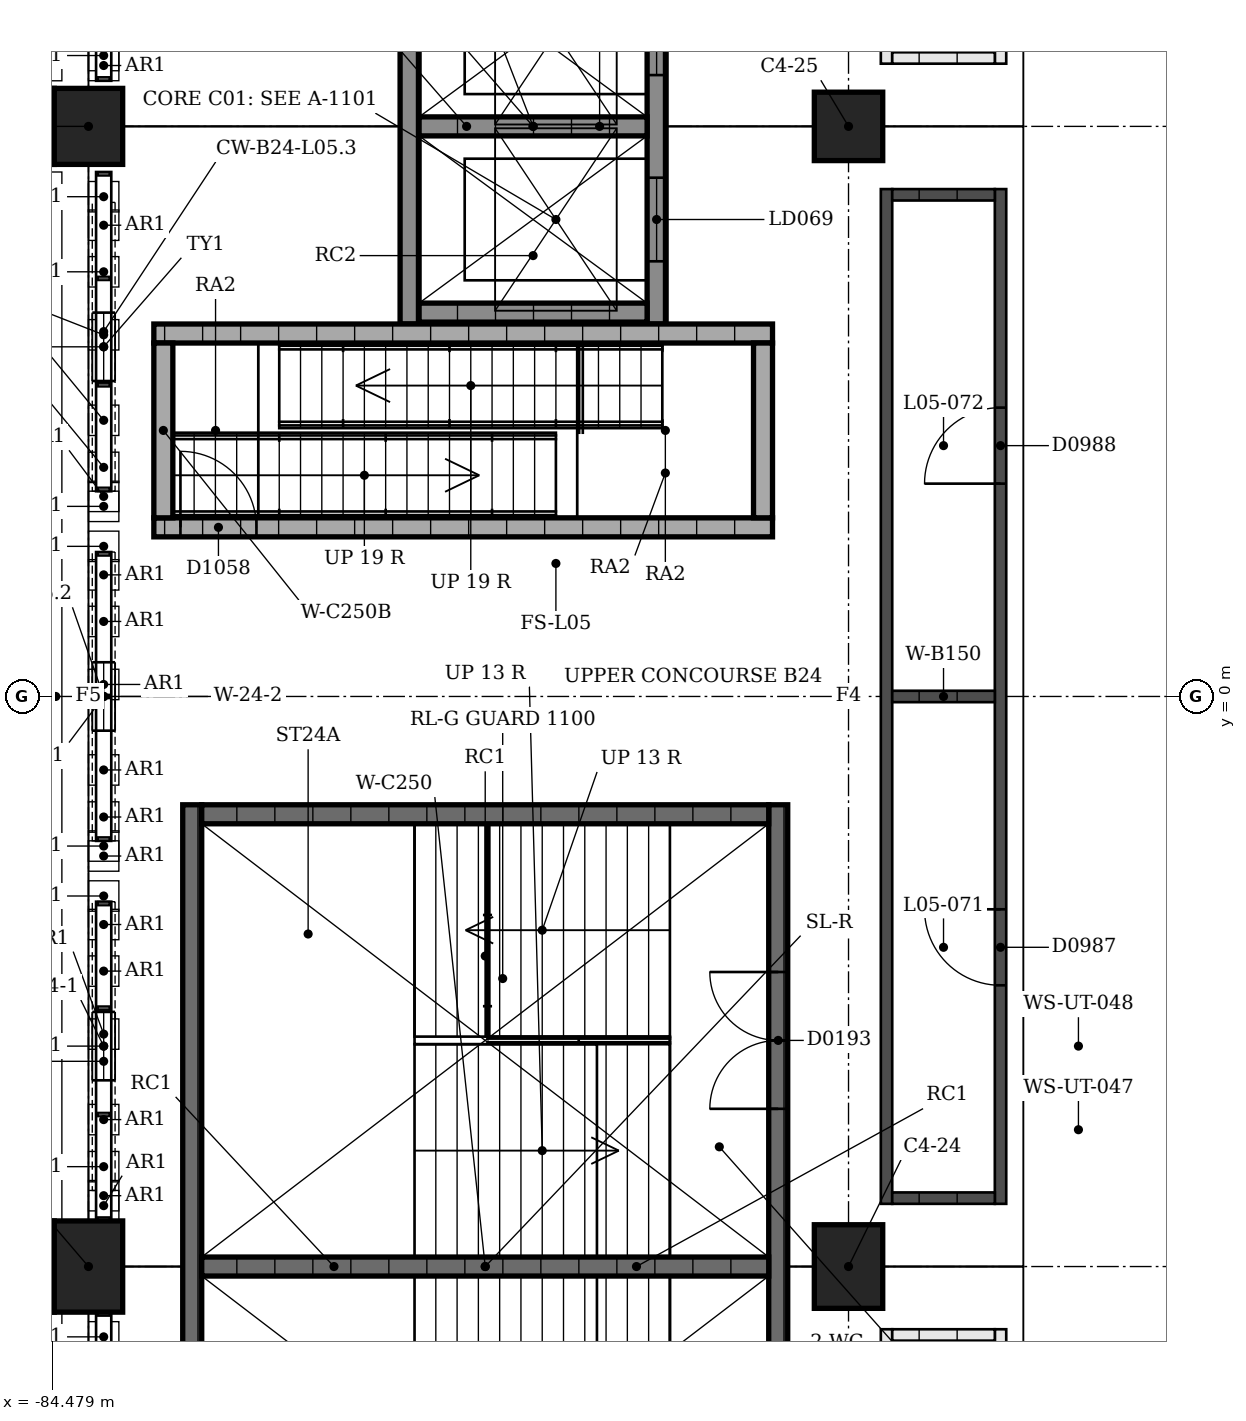
"""IFC4 building model, lengths in metres.
Left out: names, types, materials, properties, quantities, classifications, styles, units other than length and angle.
Written with IfcOpenShell. Run it as: python <this file> out.ifc"""

import sys

from ifc_helpers import new_model, si_unit, direction, frame, frame_2d, origin, origin_2d, place, context, subcontext, project, spatial, polyline, rectangle, outline, extrude, element, fill, save


model = new_model("IFC4")
c1 = context("Model", 3, precision=1e-05, world=origin(), true_north=direction((0.0, 1.0)))
c2 = subcontext(c1, "Body", "Model", "MODEL_VIEW")
j1 = project(units=[si_unit("LENGTHUNIT", "METRE"), si_unit("PLANEANGLEUNIT", "RADIAN")], contexts=[c1])
p1 = place(None, origin())
s1 = spatial("IfcSite", under=j1, at=p1, CompositionType="ELEMENT")
p2 = place(p1, origin())
s2 = spatial("IfcBuilding", under=s1, at=p2, CompositionType="ELEMENT")
p3 = place(p2, frame((0.0, 0.0, 22.5)))
s3 = spatial("IfcBuildingStorey", under=s2, at=p3, CompositionType="ELEMENT", Elevation=22.5)
p4 = place(p3, frame((-74.0, -7.5, 0.0), z_axis=(0.0, 0.0, 1.0), x_axis=(0.0, -1.0, 0.0)))
e1 = element("IfcColumn", 1, at=p4, inside=s3, PredefinedType="COLUMN", context=c2, shape_type="SweptSolid", body=[
    extrude(rectangle(XDim=1.1, YDim=0.9, at=origin_2d()), origin(), (0.0, 0.0, 1.0), 6.5),
])
p5 = place(p3, frame((-84.0, -7.5, 0.0), z_axis=(0.0, 0.0, 1.0), x_axis=(0.0, -1.0, 0.0)))
e2 = element("IfcColumn", 2, at=p5, inside=s3, PredefinedType="COLUMN", context=c2, shape_type="SweptSolid", body=[
    extrude(rectangle(XDim=1.2, YDim=0.9, at=origin_2d()), origin(), (0.0, 0.0, 1.0), 6.5),
])
p6 = place(p3, frame((-74.0, 7.5, 0.0), z_axis=(0.0, 0.0, 1.0), x_axis=(0.0, -1.0, 0.0)))
e3 = element("IfcColumn", 3, at=p6, inside=s3, PredefinedType="COLUMN", context=c2, shape_type="SweptSolid", body=[
    extrude(rectangle(XDim=0.9, YDim=0.9, at=origin_2d()), origin(), (0.0, 0.0, 1.0), 6.5),
])
p7 = place(p3, frame((-84.0, 7.5, 0.0), z_axis=(0.0, 0.0, 1.0), x_axis=(0.0, -1.0, 0.0)))
e4 = element("IfcColumn", 4, at=p7, inside=s3, PredefinedType="COLUMN", context=c2, shape_type="SweptSolid", body=[
    extrude(rectangle(XDim=1.0, YDim=0.9, at=origin_2d()), origin(), (0.0, 0.0, 1.0), 6.5),
])
p8 = place(p3, frame((-83.8, -6.5, 4.1), z_axis=(0.0, 0.0, 1.0), x_axis=(0.0, 1.0, 0.0)))
e5 = element("IfcWall", 5, at=p8, inside=s3, PredefinedType="SOLIDWALL", context=c2, shape_type="SweptSolid", body=[
    extrude(outline(polyline([(0.0, 0.0), (3.8, 0.0), (3.8, 0.05), (3.676, 1.314), (3.308, 2.581), (2.709, 3.757), (1.9, 4.8), (1.091, 3.757), (0.492, 2.581), (0.124, 1.314), (0.0, 0.05), (0.0, 0.0)])), frame((0.0, 0.15, 0.0), z_axis=(0.0, -1.0, 0.0), x_axis=(1.0, 0.0, 0.0)), (0.0, 0.0, 1.0), 0.3),
])
p9 = place(p8, frame((1.45, 0.0, 0.4)))
e6 = element("IfcOpeningElement", 6, at=p9, cuts=e5, PredefinedType="OPENING", context=c2, shape_type="SweptSolid", body=[
    extrude(rectangle(XDim=0.9, YDim=3.6, at=frame_2d((0.45, 1.8))), frame((0.0, 0.16, 0.0), z_axis=(0.0, -1.0, 0.0), x_axis=(1.0, 0.0, 0.0)), (0.0, 0.0, 1.0), 0.32),
])
p10 = place(p3, frame((-83.8, -1.9, 4.1), z_axis=(0.0, 0.0, 1.0), x_axis=(0.0, 1.0, 0.0)))
e7 = element("IfcWall", 7, at=p10, inside=s3, PredefinedType="SOLIDWALL", context=c2, shape_type="SweptSolid", body=[
    extrude(outline(polyline([(0.0, 0.0), (3.8, 0.0), (3.8, 0.05), (3.676, 1.314), (3.308, 2.581), (2.709, 3.757), (1.9, 4.8), (1.091, 3.757), (0.492, 2.581), (0.124, 1.314), (0.0, 0.05), (0.0, 0.0)])), frame((0.0, 0.15, 0.0), z_axis=(0.0, -1.0, 0.0), x_axis=(1.0, 0.0, 0.0)), (0.0, 0.0, 1.0), 0.3),
])
p11 = place(p10, frame((1.45, 0.0, 0.4)))
e8 = element("IfcOpeningElement", 8, at=p11, cuts=e7, PredefinedType="OPENING", context=c2, shape_type="SweptSolid", body=[
    extrude(rectangle(XDim=0.9, YDim=3.6, at=frame_2d((0.45, 1.8))), frame((0.0, 0.16, 0.0), z_axis=(0.0, -1.0, 0.0), x_axis=(1.0, 0.0, 0.0)), (0.0, 0.0, 1.0), 0.32),
])
p12 = place(p3, frame((-83.8, 2.7, 4.1), z_axis=(0.0, 0.0, 1.0), x_axis=(0.0, 1.0, 0.0)))
e9 = element("IfcWall", 9, at=p12, inside=s3, PredefinedType="SOLIDWALL", context=c2, shape_type="SweptSolid", body=[
    extrude(outline(polyline([(0.0, 0.0), (3.8, 0.0), (3.8, 0.05), (3.676, 1.314), (3.308, 2.581), (2.709, 3.757), (1.9, 4.8), (1.091, 3.757), (0.492, 2.581), (0.124, 1.314), (0.0, 0.05), (0.0, 0.0)])), frame((0.0, 0.15, 0.0), z_axis=(0.0, -1.0, 0.0), x_axis=(1.0, 0.0, 0.0)), (0.0, 0.0, 1.0), 0.3),
])
p13 = place(p12, frame((1.45, 0.0, 0.4)))
e10 = element("IfcOpeningElement", 10, at=p13, cuts=e9, PredefinedType="OPENING", context=c2, shape_type="SweptSolid", body=[
    extrude(rectangle(XDim=0.9, YDim=3.6, at=frame_2d((0.45, 1.8))), frame((0.0, 0.16, 0.0), z_axis=(0.0, -1.0, 0.0), x_axis=(1.0, 0.0, 0.0)), (0.0, 0.0, 1.0), 0.32),
])
p14 = place(p3, frame((-74.925, -1.425, 0.0), z_axis=(0.0, 0.0, 1.0), x_axis=(0.0, -1.0, 0.0)))
e11 = element("IfcWall", 11, at=p14, inside=s3, PredefinedType="SHEAR", context=c2, shape_type="SweptSolid", body=[
    extrude(rectangle(XDim=12.15, YDim=0.25, at=frame_2d((6.075, 0.0))), origin(), (0.0, 0.0, 1.0), 2.1),
])
p15 = place(p14, frame((2.2, 0.0, 0.0)))
e12 = element("IfcOpeningElement", 12, at=p15, cuts=e11, PredefinedType="OPENING", context=c2, shape_type="SweptSolid", body=[
    extrude(rectangle(XDim=1.8, YDim=2.1, at=frame_2d((0.9, 1.05))), frame((0.0, 0.125, 0.0), z_axis=(0.0, -1.0, 0.0), x_axis=(1.0, 0.0, 0.0)), (0.0, 0.0, 1.0), 0.25),
])
p16 = place(p14, frame((8.15, 0.0, 0.0)))
e13 = element("IfcOpeningElement", 13, at=p16, cuts=e11, PredefinedType="OPENING", context=c2, shape_type="SweptSolid", body=[
    extrude(rectangle(XDim=1.8, YDim=2.1, at=frame_2d((0.9, 1.05))), frame((0.0, 0.125, 0.0), z_axis=(0.0, -1.0, 0.0), x_axis=(1.0, 0.0, 0.0)), (0.0, 0.0, 1.0), 0.25),
])
p17 = place(p3, frame((-82.635, -1.425, 0.0), z_axis=(0.0, 0.0, 1.0), x_axis=(0.0, -1.0, 0.0)))
e14 = element("IfcWall", 14, at=p17, inside=s3, PredefinedType="SHEAR", context=c2, shape_type="SweptSolid", body=[
    extrude(rectangle(XDim=12.15, YDim=0.25, at=frame_2d((6.075, 0.0))), origin(), (0.0, 0.0, 1.0), 2.1),
])
for number, where, z_axis, x_axis in (
    (15, (-75.05, -1.55, 0.0), (0.0, 0.0, 1.0), (-1.0, 0.0, 0.0)),
    (16, (-75.05, -7.5, 0.0), (0.0, 0.0, 1.0), (-1.0, 0.0, 0.0)),
):
    element("IfcWall", number, at=place(p3, frame(where, z_axis=z_axis, x_axis=x_axis)), inside=s3, PredefinedType="SHEAR", context=c2, shape_type="SweptSolid", body=[
        extrude(rectangle(XDim=7.46, YDim=0.25, at=frame_2d((3.73, 0.0))), origin(), (0.0, 0.0, 1.0), 2.1),
    ])
p18 = place(p3, frame((-76.525, 10.075, 0.0), z_axis=(0.0, 0.0, 1.0), x_axis=(0.0, -1.0, 0.0)))
e17 = element("IfcWall", 17, at=p18, inside=s3, PredefinedType="SHEAR", context=c2, shape_type="SweptSolid", body=[
    extrude(rectangle(XDim=5.175, YDim=0.25, at=frame_2d((2.587, 0.0))), origin(), (0.0, 0.0, 1.0), 3.4),
])
p19 = place(p18, frame((0.8, 0.0, 0.0)))
e18 = element("IfcOpeningElement", 18, at=p19, cuts=e17, PredefinedType="OPENING", context=c2, shape_type="SweptSolid", body=[
    extrude(rectangle(XDim=1.1, YDim=2.1, at=frame_2d((0.55, 1.05))), frame((0.0, 0.125, 0.0), z_axis=(0.0, -1.0, 0.0), x_axis=(1.0, 0.0, 0.0)), (0.0, 0.0, 1.0), 0.25),
])
p20 = place(p18, frame((3.25, 0.0, 0.0)))
e19 = element("IfcOpeningElement", 19, at=p20, cuts=e17, PredefinedType="OPENING", context=c2, shape_type="SweptSolid", body=[
    extrude(rectangle(XDim=1.1, YDim=2.1, at=frame_2d((0.55, 1.05))), frame((0.0, 0.125, 0.0), z_axis=(0.0, -1.0, 0.0), x_axis=(1.0, 0.0, 0.0)), (0.0, 0.0, 1.0), 0.25),
])
p21 = place(p3, frame((-79.775, 10.075, 0.0), z_axis=(0.0, 0.0, 1.0), x_axis=(0.0, -1.0, 0.0)))
e20 = element("IfcWall", 20, at=p21, inside=s3, PredefinedType="SHEAR", context=c2, shape_type="SweptSolid", body=[
    extrude(rectangle(XDim=5.175, YDim=0.25, at=frame_2d((2.587, 0.0))), origin(), (0.0, 0.0, 1.0), 3.4),
])
for number, where, z_axis, x_axis in (
    (21, (-76.65, 5.05, 0.0), (0.0, 0.0, 1.0), (-1.0, 0.0, 0.0)),
    (22, (-76.65, 7.5, 0.0), (0.0, 0.0, 1.0), (-1.0, 0.0, 0.0)),
):
    element("IfcWall", number, at=place(p3, frame(where, z_axis=z_axis, x_axis=x_axis)), inside=s3, PredefinedType="SHEAR", context=c2, shape_type="SweptSolid", body=[
        extrude(rectangle(XDim=3.0, YDim=0.25, at=frame_2d((1.5, 0.0))), origin(), (0.0, 0.0, 1.0), 3.4),
    ])
p22 = place(p3, frame((-72.0, -8.325, 0.0), z_axis=(0.0, 0.0, 1.0), x_axis=(0.0, -1.0, 0.0)))
e23 = element("IfcWall", 23, at=p22, inside=s3, PredefinedType="PARTITIONING", context=c2, shape_type="SweptSolid", body=[
    extrude(rectangle(XDim=13.35, YDim=0.15, at=frame_2d((6.675, 0.0))), origin(), (0.0, 0.0, 1.0), 3.0),
])
p23 = place(p22, frame((1.671, 0.0, 0.0)))
e24 = element("IfcOpeningElement", 24, at=p23, cuts=e23, PredefinedType="OPENING", context=c2, shape_type="SweptSolid", body=[
    extrude(rectangle(XDim=0.9, YDim=2.1, at=frame_2d((0.45, 1.05))), frame((0.0, 0.075, 0.0), z_axis=(0.0, -1.0, 0.0), x_axis=(1.0, 0.0, 0.0)), (0.0, 0.0, 1.0), 0.15),
])
p24 = place(p22, frame((5.763, 0.0, 0.0)))
e25 = element("IfcOpeningElement", 25, at=p24, cuts=e23, PredefinedType="OPENING", context=c2, shape_type="SweptSolid", body=[
    extrude(rectangle(XDim=0.9, YDim=2.1, at=frame_2d((0.45, 1.05))), frame((0.0, 0.075, 0.0), z_axis=(0.0, -1.0, 0.0), x_axis=(1.0, 0.0, 0.0)), (0.0, 0.0, 1.0), 0.15),
])
p25 = place(p22, frame((8.963, 0.0, 0.0)))
e26 = element("IfcOpeningElement", 26, at=p25, cuts=e23, PredefinedType="OPENING", context=c2, shape_type="SweptSolid", body=[
    extrude(rectangle(XDim=1.1, YDim=2.1, at=frame_2d((0.55, 1.05))), frame((0.0, 0.075, 0.0), z_axis=(0.0, -1.0, 0.0), x_axis=(1.0, 0.0, 0.0)), (0.0, 0.0, 1.0), 0.15),
])
p26 = place(p22, frame((11.471, 0.0, 0.0)))
e27 = element("IfcOpeningElement", 27, at=p26, cuts=e23, PredefinedType="OPENING", context=c2, shape_type="SweptSolid", body=[
    extrude(rectangle(XDim=1.1, YDim=2.1, at=frame_2d((0.55, 1.05))), frame((0.0, 0.075, 0.0), z_axis=(0.0, -1.0, 0.0), x_axis=(1.0, 0.0, 0.0)), (0.0, 0.0, 1.0), 0.15),
])
p27 = place(p3, frame((-73.5, -8.325, 0.0), z_axis=(0.0, 0.0, 1.0), x_axis=(0.0, -1.0, 0.0)))
e28 = element("IfcWall", 28, at=p27, inside=s3, PredefinedType="PARTITIONING", context=c2, shape_type="SweptSolid", body=[
    extrude(rectangle(XDim=13.35, YDim=0.15, at=frame_2d((6.675, 0.0))), origin(), (0.0, 0.0, 1.0), 3.0),
])
p28 = place(p3, frame((-72.075, -8.4, 0.0), z_axis=(0.0, 0.0, 1.0), x_axis=(-1.0, 0.0, 0.0)))
e29 = element("IfcWall", 29, at=p28, inside=s3, PredefinedType="PARTITIONING", context=c2, shape_type="SweptSolid", body=[
    extrude(rectangle(XDim=1.35, YDim=0.15, at=frame_2d((0.675, 0.0))), origin(), (0.0, 0.0, 1.0), 3.0),
])
p29 = place(p3, frame((-72.0, -6.675, 0.0), z_axis=(0.0, 0.0, 1.0), x_axis=(0.0, 1.0, 0.0)))
e30 = element("IfcWall", 30, at=p29, inside=s3, PredefinedType="SOLIDWALL", context=c2, shape_type="SweptSolid", body=[
    extrude(rectangle(XDim=13.35, YDim=0.15, at=frame_2d((6.675, 0.0))), origin(), (0.0, 0.0, 1.0), 3.0),
])
p30 = place(p29, frame((2.875, 0.0, 0.0)))
e31 = element("IfcOpeningElement", 31, at=p30, cuts=e30, PredefinedType="OPENING", context=c2, shape_type="SweptSolid", body=[
    extrude(rectangle(XDim=1.0, YDim=2.1, at=frame_2d((0.5, 1.05))), frame((0.0, 0.075, 0.0), z_axis=(0.0, -1.0, 0.0), x_axis=(1.0, 0.0, 0.0)), (0.0, 0.0, 1.0), 0.15),
])
p31 = place(p29, frame((9.475, 0.0, 0.0)))
e32 = element("IfcOpeningElement", 32, at=p31, cuts=e30, PredefinedType="OPENING", context=c2, shape_type="SweptSolid", body=[
    extrude(rectangle(XDim=1.0, YDim=2.1, at=frame_2d((0.5, 1.05))), frame((0.0, 0.075, 0.0), z_axis=(0.0, -1.0, 0.0), x_axis=(1.0, 0.0, 0.0)), (0.0, 0.0, 1.0), 0.15),
])
p32 = place(p3, frame((-73.5, -6.675, 0.0), z_axis=(0.0, 0.0, 1.0), x_axis=(0.0, 1.0, 0.0)))
e33 = element("IfcWall", 33, at=p32, inside=s3, PredefinedType="SOLIDWALL", context=c2, shape_type="SweptSolid", body=[
    extrude(rectangle(XDim=13.35, YDim=0.15, at=frame_2d((6.675, 0.0))), origin(), (0.0, 0.0, 1.0), 3.0),
])
for number, where, z_axis, x_axis in (
    (34, (-72.075, -6.6, 0.0), (0.0, 0.0, 1.0), (-1.0, 0.0, 0.0)),
    (35, (-72.075, 0.0, 0.0), (0.0, 0.0, 1.0), (-1.0, 0.0, 0.0)),
    (36, (-72.075, 6.6, 0.0), (0.0, 0.0, 1.0), (-1.0, 0.0, 0.0)),
):
    element("IfcWall", number, at=place(p3, frame(where, z_axis=z_axis, x_axis=x_axis)), inside=s3, PredefinedType="SOLIDWALL", context=c2, shape_type="SweptSolid", body=[
        extrude(rectangle(XDim=1.35, YDim=0.15, at=frame_2d((0.675, 0.0))), origin(), (0.0, 0.0, 1.0), 3.0),
    ])
p33 = place(p3, frame((-72.0, 21.675, 0.0), z_axis=(0.0, 0.0, 1.0), x_axis=(0.0, -1.0, 0.0)))
e37 = element("IfcWall", 37, at=p33, inside=s3, PredefinedType="PARTITIONING", context=c2, shape_type="SweptSolid", body=[
    extrude(rectangle(XDim=13.35, YDim=0.15, at=frame_2d((6.675, 0.0))), origin(), (0.0, 0.0, 1.0), 3.0),
])
p34 = place(p33, frame((1.671, 0.0, 0.0)))
e38 = element("IfcOpeningElement", 38, at=p34, cuts=e37, PredefinedType="OPENING", context=c2, shape_type="SweptSolid", body=[
    extrude(rectangle(XDim=0.9, YDim=2.1, at=frame_2d((0.45, 1.05))), frame((0.0, 0.075, 0.0), z_axis=(0.0, -1.0, 0.0), x_axis=(1.0, 0.0, 0.0)), (0.0, 0.0, 1.0), 0.15),
])
p35 = place(p33, frame((5.763, 0.0, 0.0)))
e39 = element("IfcOpeningElement", 39, at=p35, cuts=e37, PredefinedType="OPENING", context=c2, shape_type="SweptSolid", body=[
    extrude(rectangle(XDim=0.9, YDim=2.1, at=frame_2d((0.45, 1.05))), frame((0.0, 0.075, 0.0), z_axis=(0.0, -1.0, 0.0), x_axis=(1.0, 0.0, 0.0)), (0.0, 0.0, 1.0), 0.15),
])
p36 = place(p33, frame((8.963, 0.0, 0.0)))
e40 = element("IfcOpeningElement", 40, at=p36, cuts=e37, PredefinedType="OPENING", context=c2, shape_type="SweptSolid", body=[
    extrude(rectangle(XDim=1.1, YDim=2.1, at=frame_2d((0.55, 1.05))), frame((0.0, 0.075, 0.0), z_axis=(0.0, -1.0, 0.0), x_axis=(1.0, 0.0, 0.0)), (0.0, 0.0, 1.0), 0.15),
])
p37 = place(p33, frame((11.471, 0.0, 0.0)))
e41 = element("IfcOpeningElement", 41, at=p37, cuts=e37, PredefinedType="OPENING", context=c2, shape_type="SweptSolid", body=[
    extrude(rectangle(XDim=1.1, YDim=2.1, at=frame_2d((0.55, 1.05))), frame((0.0, 0.075, 0.0), z_axis=(0.0, -1.0, 0.0), x_axis=(1.0, 0.0, 0.0)), (0.0, 0.0, 1.0), 0.15),
])
p38 = place(p3, frame((-73.5, 21.675, 0.0), z_axis=(0.0, 0.0, 1.0), x_axis=(0.0, -1.0, 0.0)))
e42 = element("IfcWall", 42, at=p38, inside=s3, PredefinedType="PARTITIONING", context=c2, shape_type="SweptSolid", body=[
    extrude(rectangle(XDim=13.35, YDim=0.15, at=frame_2d((6.675, 0.0))), origin(), (0.0, 0.0, 1.0), 3.0),
])
p39 = place(p3, frame((-72.075, 8.4, 0.0), z_axis=(0.0, 0.0, 1.0), x_axis=(-1.0, 0.0, 0.0)))
e43 = element("IfcWall", 43, at=p39, inside=s3, PredefinedType="PARTITIONING", context=c2, shape_type="SweptSolid", body=[
    extrude(rectangle(XDim=1.35, YDim=0.15, at=frame_2d((0.675, 0.0))), origin(), (0.0, 0.0, 1.0), 3.0),
])
p40 = place(p3, frame((-75.0, 4.775, 0.0), z_axis=(0.0, 0.0, 1.0), x_axis=(-1.0, 0.0, 0.0)))
e44 = element("IfcWall", 44, at=p40, inside=s3, PredefinedType="SHEAR", context=c2, shape_type="SweptSolid", body=[
    extrude(rectangle(XDim=8.14, YDim=0.25, at=frame_2d((4.07, 0.0))), origin(), (0.0, 0.0, 1.0), 7.6),
])
p41 = place(p3, frame((-75.0, 2.225, 0.0), z_axis=(0.0, 0.0, 1.0), x_axis=(-1.0, 0.0, 0.0)))
e45 = element("IfcWall", 45, at=p41, inside=s3, PredefinedType="SHEAR", context=c2, shape_type="SweptSolid", body=[
    extrude(rectangle(XDim=8.14, YDim=0.25, at=frame_2d((4.07, 0.0))), origin(), (0.0, 0.0, 1.0), 7.6),
])
p42 = place(p41, frame((6.79, 0.0, 0.0)))
e46 = element("IfcOpeningElement", 46, at=p42, cuts=e45, PredefinedType="OPENING", context=c2, shape_type="SweptSolid", body=[
    extrude(rectangle(XDim=1.0, YDim=2.1, at=frame_2d((0.5, 1.05))), frame((0.0, 0.125, 0.0), z_axis=(0.0, -1.0, 0.0), x_axis=(1.0, 0.0, 0.0)), (0.0, 0.0, 1.0), 0.25),
])
for number, where, z_axis, x_axis in (
    (47, (-75.125, 4.65, 0.0), (0.0, 0.0, 1.0), (0.0, -1.0, 0.0)),
    (48, (-83.015, 4.65, 0.0), (0.0, 0.0, 1.0), (0.0, -1.0, 0.0)),
):
    element("IfcWall", number, at=place(p3, frame(where, z_axis=z_axis, x_axis=x_axis)), inside=s3, PredefinedType="SHEAR", context=c2, shape_type="SweptSolid", body=[
        extrude(rectangle(XDim=2.3, YDim=0.25, at=frame_2d((1.15, 0.0))), origin(), (0.0, 0.0, 1.0), 7.6),
    ])
p43 = place(p9, origin())
e49 = element("IfcWindow", 49, at=p43, inside=s3, PartitioningType="SINGLE_PANEL", PredefinedType="WINDOW", context=c2, shape_type="SweptSolid", body=[
    extrude(rectangle(XDim=0.9, YDim=3.6, at=frame_2d((0.45, 1.8))), frame((0.0, 0.03, 0.0), z_axis=(0.0, -1.0, 0.0), x_axis=(1.0, 0.0, 0.0)), (0.0, 0.0, 1.0), 0.06),
])
fill(e6, e49)
p44 = place(p11, origin())
e50 = element("IfcWindow", 50, at=p44, inside=s3, PartitioningType="SINGLE_PANEL", PredefinedType="WINDOW", context=c2, shape_type="SweptSolid", body=[
    extrude(rectangle(XDim=0.9, YDim=3.6, at=frame_2d((0.45, 1.8))), frame((0.0, 0.03, 0.0), z_axis=(0.0, -1.0, 0.0), x_axis=(1.0, 0.0, 0.0)), (0.0, 0.0, 1.0), 0.06),
])
fill(e8, e50)
p45 = place(p13, origin())
e51 = element("IfcWindow", 51, at=p45, inside=s3, PartitioningType="SINGLE_PANEL", PredefinedType="WINDOW", context=c2, shape_type="SweptSolid", body=[
    extrude(rectangle(XDim=0.9, YDim=3.6, at=frame_2d((0.45, 1.8))), frame((0.0, 0.03, 0.0), z_axis=(0.0, -1.0, 0.0), x_axis=(1.0, 0.0, 0.0)), (0.0, 0.0, 1.0), 0.06),
])
fill(e10, e51)
p46 = place(p15, origin())
e52 = element("IfcDoor", 52, at=p46, inside=s3, OperationType="DOUBLE_DOOR_SINGLE_SWING", PredefinedType="DOOR", context=c2, shape_type="SweptSolid", body=[
    extrude(rectangle(XDim=1.8, YDim=2.1, at=frame_2d((0.9, 1.05))), frame((0.0, 0.025, 0.0), z_axis=(0.0, -1.0, 0.0), x_axis=(1.0, 0.0, 0.0)), (0.0, 0.0, 1.0), 0.05),
])
fill(e12, e52)
p47 = place(p19, origin())
e53 = element("IfcDoor", 53, at=p47, inside=s3, OperationType="SLIDING_TO_LEFT", PredefinedType="DOOR", context=c2, shape_type="SweptSolid", body=[
    extrude(rectangle(XDim=1.1, YDim=2.1, at=frame_2d((0.55, 1.05))), frame((0.0, 0.025, 0.0), z_axis=(0.0, -1.0, 0.0), x_axis=(1.0, 0.0, 0.0)), (0.0, 0.0, 1.0), 0.05),
])
fill(e18, e53)
p48 = place(p20, origin())
e54 = element("IfcDoor", 54, at=p48, inside=s3, OperationType="SLIDING_TO_LEFT", PredefinedType="DOOR", context=c2, shape_type="SweptSolid", body=[
    extrude(rectangle(XDim=1.1, YDim=2.1, at=frame_2d((0.55, 1.05))), frame((0.0, 0.025, 0.0), z_axis=(0.0, -1.0, 0.0), x_axis=(1.0, 0.0, 0.0)), (0.0, 0.0, 1.0), 0.05),
])
fill(e19, e54)
p49 = place(p30, origin())
e55 = element("IfcDoor", 55, at=p49, inside=s3, OperationType="SINGLE_SWING_LEFT", PredefinedType="DOOR", context=c2, shape_type="SweptSolid", body=[
    extrude(rectangle(XDim=1.0, YDim=2.1, at=frame_2d((0.5, 1.05))), frame((0.0, 0.025, 0.0), z_axis=(0.0, -1.0, 0.0), x_axis=(1.0, 0.0, 0.0)), (0.0, 0.0, 1.0), 0.05),
])
fill(e31, e55)
p50 = place(p31, origin())
e56 = element("IfcDoor", 56, at=p50, inside=s3, OperationType="SINGLE_SWING_RIGHT", PredefinedType="DOOR", context=c2, shape_type="SweptSolid", body=[
    extrude(rectangle(XDim=1.0, YDim=2.1, at=frame_2d((0.5, 1.05))), frame((0.0, 0.025, 0.0), z_axis=(0.0, -1.0, 0.0), x_axis=(1.0, 0.0, 0.0)), (0.0, 0.0, 1.0), 0.05),
])
fill(e32, e56)
p51 = place(p42, origin())
e57 = element("IfcDoor", 57, at=p51, inside=s3, OperationType="SINGLE_SWING_RIGHT", PredefinedType="DOOR", context=c2, shape_type="SweptSolid", body=[
    extrude(rectangle(XDim=1.0, YDim=2.1, at=frame_2d((0.5, 1.05))), frame((0.0, 0.025, 0.0), z_axis=(0.0, -1.0, 0.0), x_axis=(1.0, 0.0, 0.0)), (0.0, 0.0, 1.0), 0.05),
])
fill(e46, e57)
save(model, sys.argv[1])
